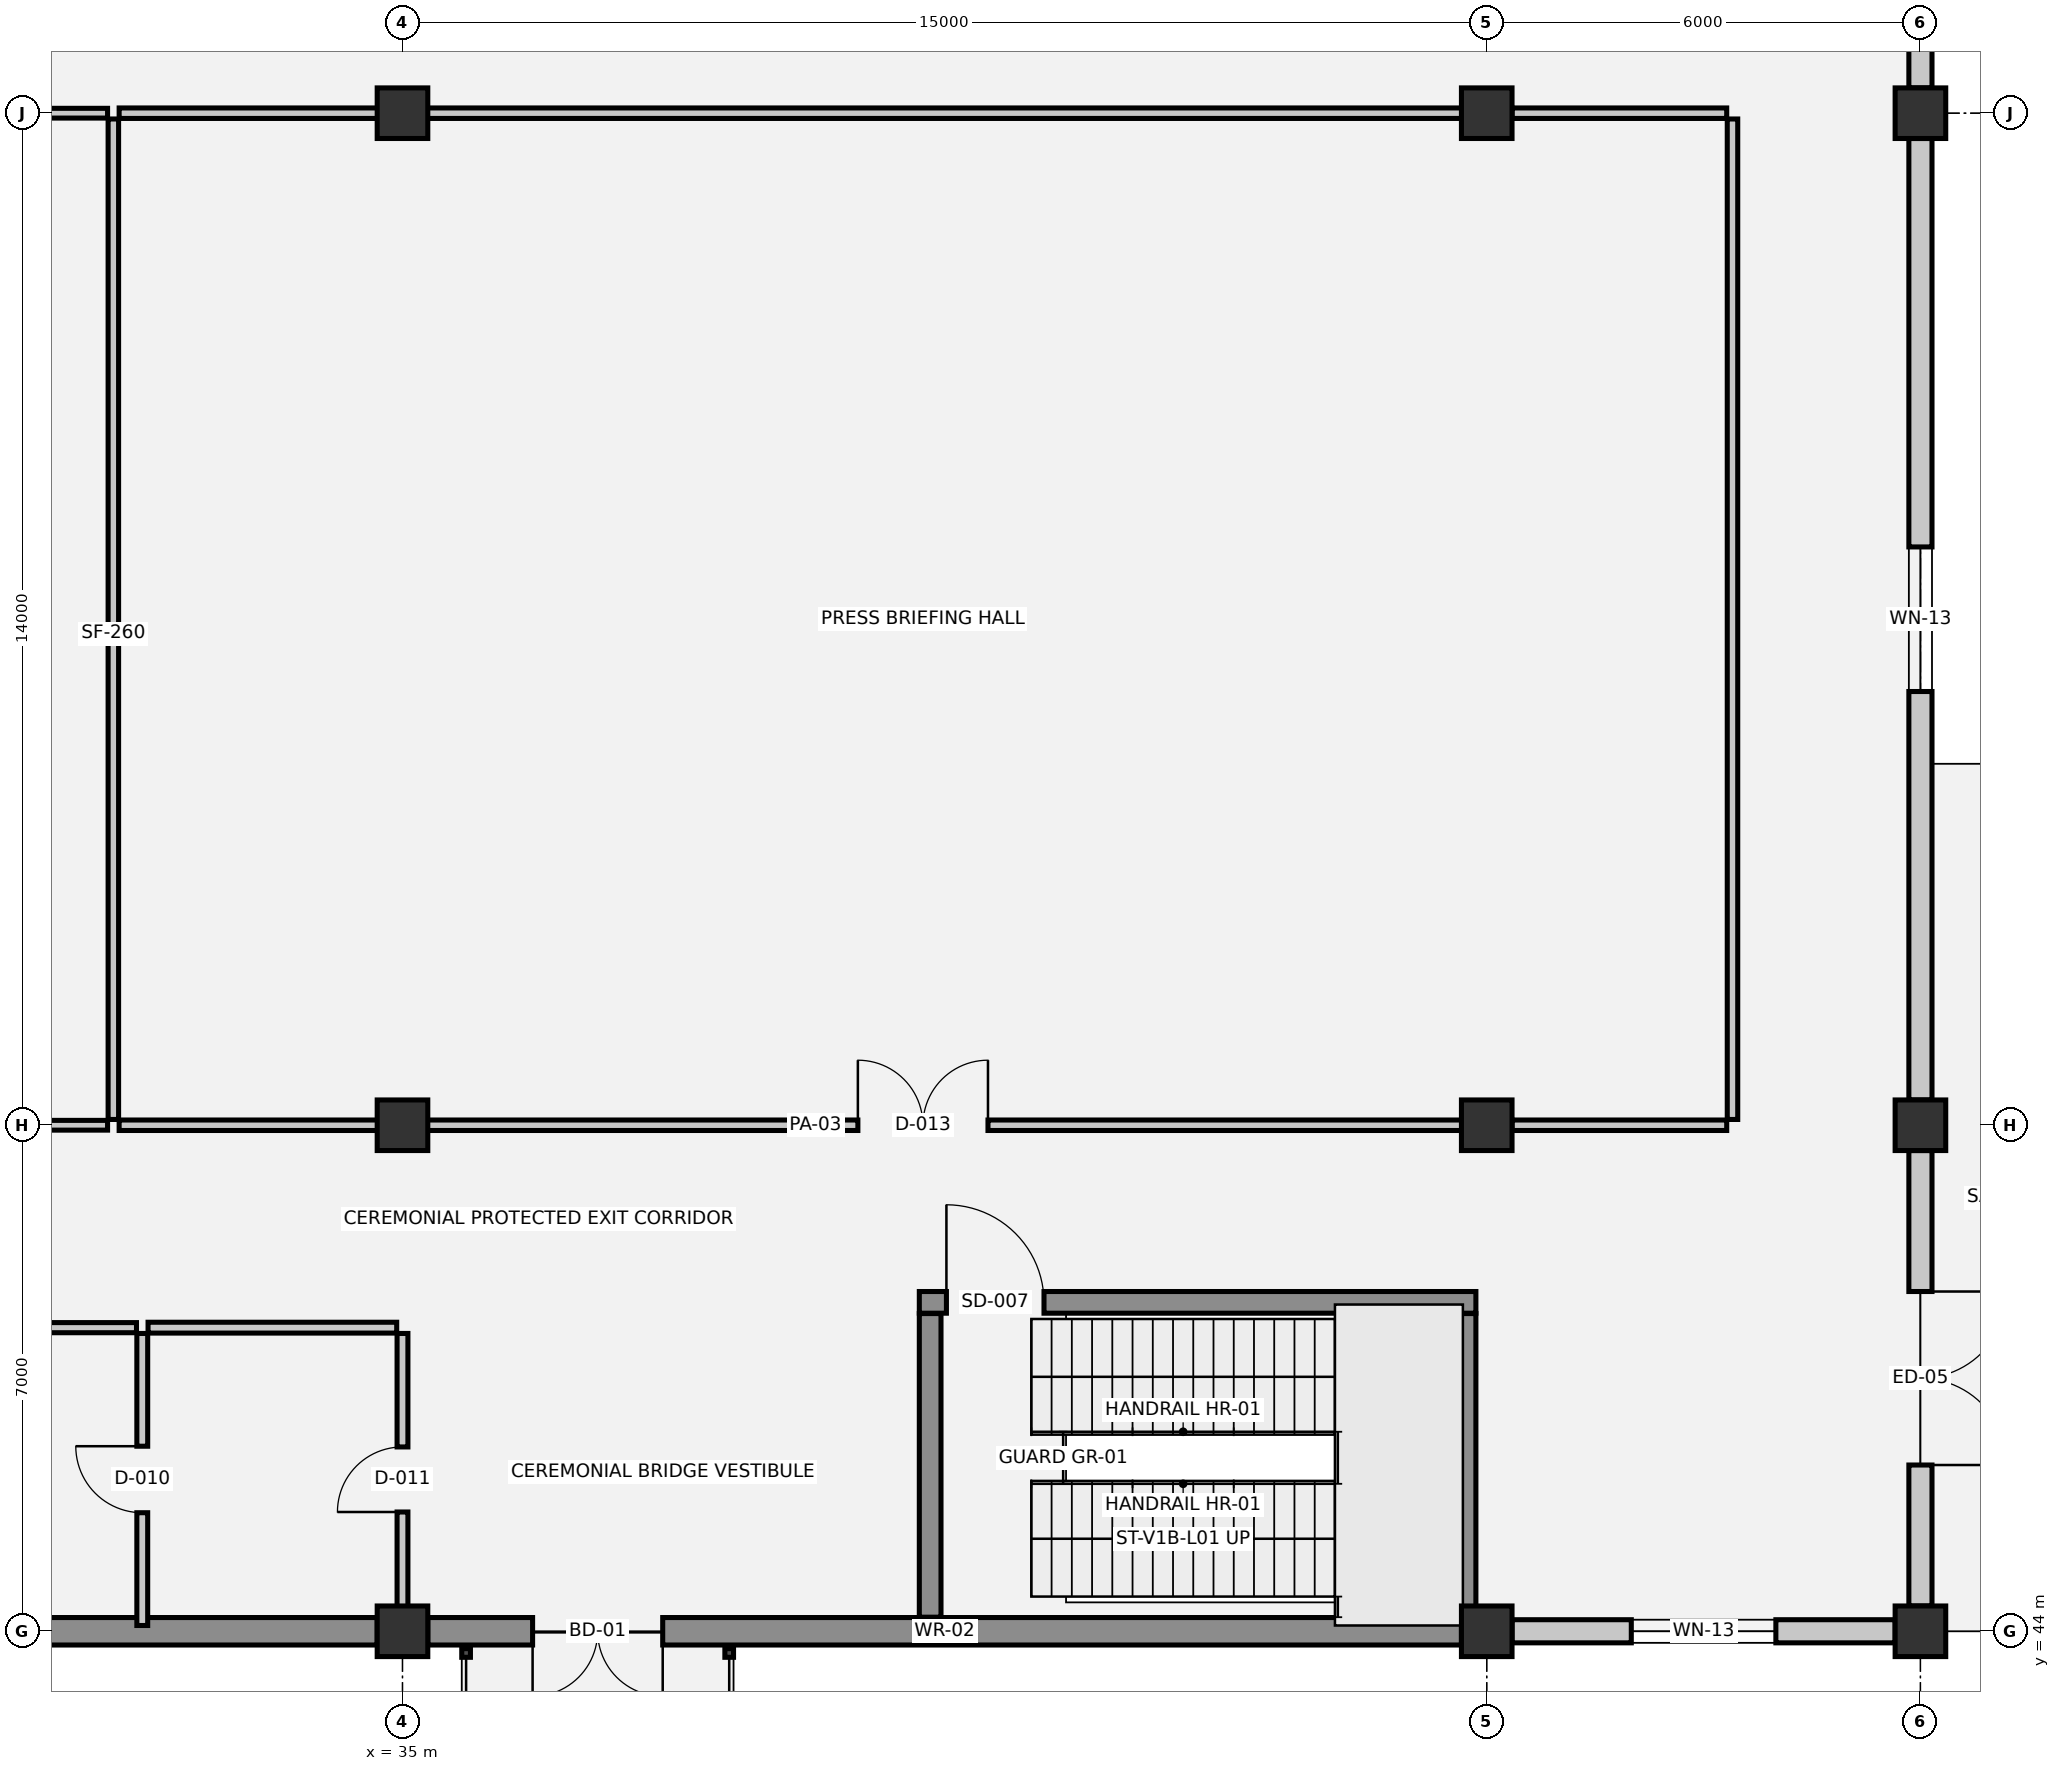
"""IFC4 building model, lengths in metres.
Left out: names, types, materials, properties, quantities, classifications, styles, units other than length and angle.
Written with IfcOpenShell. Run it as: python <this file> out.ifc"""

import sys

from ifc_helpers import new_model, si_unit, direction, frame, frame_2d, origin, origin_2d, place, context, subcontext, project, spatial, rectangle, extrude, element, fill, save


model = new_model("IFC4")
c1 = context("Model", 3, precision=1e-05, world=origin(), true_north=direction((0.0, 1.0)))
c2 = subcontext(c1, "Body", "Model", "MODEL_VIEW")
j1 = project(units=[si_unit("LENGTHUNIT", "METRE"), si_unit("PLANEANGLEUNIT", "RADIAN")], contexts=[c1])
p1 = place(None, origin())
s1 = spatial("IfcSite", under=j1, at=p1, CompositionType="ELEMENT")
p2 = place(p1, origin())
s2 = spatial("IfcBuilding", under=s1, at=p2, CompositionType="ELEMENT")
p3 = place(p2, origin())
s3 = spatial("IfcBuildingStorey", under=s2, at=p3, CompositionType="ELEMENT", Elevation=0.0)
for number, where, z_axis, x_axis in (
    (1, (35.0, 44.0, 0.0), (0.0, 0.0, 1.0), (1.0, 0.0, 0.0)),
    (2, (35.0, 51.0, 0.0), (0.0, 0.0, 1.0), (1.0, 0.0, 0.0)),
    (3, (35.0, 65.0, 0.0), (0.0, 0.0, 1.0), (1.0, 0.0, 0.0)),
    (4, (50.0, 44.0, 0.0), (0.0, 0.0, 1.0), (1.0, 0.0, 0.0)),
    (5, (50.0, 51.0, 0.0), (0.0, 0.0, 1.0), (1.0, 0.0, 0.0)),
    (6, (50.0, 65.0, 0.0), (0.0, 0.0, 1.0), (1.0, 0.0, 0.0)),
    (7, (56.0, 44.0, 0.0), (0.0, 0.0, 1.0), (1.0, 0.0, 0.0)),
    (8, (56.0, 51.0, 0.0), (0.0, 0.0, 1.0), (1.0, 0.0, 0.0)),
    (9, (56.0, 65.0, 0.0), (0.0, 0.0, 1.0), (1.0, 0.0, 0.0)),
):
    element("IfcColumn", number, at=place(p3, frame(where, z_axis=z_axis, x_axis=x_axis)), inside=s3, PredefinedType="COLUMN", context=c2, shape_type="SweptSolid", body=[
        extrude(rectangle(XDim=0.7, YDim=0.7, at=origin_2d()), origin(), (0.0, 0.0, 1.0), 5.4),
    ])
p4 = place(p3, frame((56.0, 71.65, 0.0), z_axis=(0.0, 0.0, 1.0), x_axis=(0.0, -1.0, 0.0)))
e10 = element("IfcWall", 10, at=p4, inside=s3, PredefinedType="SOLIDWALL", context=c2, shape_type="SweptSolid", body=[
    extrude(rectangle(XDim=6.3, YDim=0.32, at=frame_2d((3.15, 0.0))), origin(), (0.0, 0.0, 1.0), 4.01),
])
p5 = place(p4, frame((2.15, 0.0, 0.9)))
e11 = element("IfcOpeningElement", 11, at=p5, cuts=e10, PredefinedType="OPENING", context=c2, shape_type="SweptSolid", body=[
    extrude(rectangle(XDim=2.0, YDim=2.2, at=frame_2d((1.0, 1.1))), frame((0.0, 0.17, 0.0), z_axis=(0.0, -1.0, 0.0), x_axis=(1.0, 0.0, 0.0)), (0.0, 0.0, 1.0), 0.34),
])
p6 = place(p3, frame((56.0, 64.65, 0.0), z_axis=(0.0, 0.0, 1.0), x_axis=(0.0, -1.0, 0.0)))
e12 = element("IfcWall", 12, at=p6, inside=s3, PredefinedType="SOLIDWALL", context=c2, shape_type="SweptSolid", body=[
    extrude(rectangle(XDim=13.3, YDim=0.32, at=frame_2d((6.65, 0.0))), origin(), (0.0, 0.0, 1.0), 4.01),
])
p7 = place(p6, frame((5.65, 0.0, 0.9)))
e13 = element("IfcOpeningElement", 13, at=p7, cuts=e12, PredefinedType="OPENING", context=c2, shape_type="SweptSolid", body=[
    extrude(rectangle(XDim=2.0, YDim=2.2, at=frame_2d((1.0, 1.1))), frame((0.0, 0.17, 0.0), z_axis=(0.0, -1.0, 0.0), x_axis=(1.0, 0.0, 0.0)), (0.0, 0.0, 1.0), 0.34),
])
p8 = place(p3, frame((56.0, 50.65, 0.0), z_axis=(0.0, 0.0, 1.0), x_axis=(0.0, -1.0, 0.0)))
e14 = element("IfcWall", 14, at=p8, inside=s3, PredefinedType="SOLIDWALL", context=c2, shape_type="SweptSolid", body=[
    extrude(rectangle(XDim=6.3, YDim=0.32, at=frame_2d((3.15, 0.0))), origin(), (0.0, 0.0, 1.0), 4.01),
])
p9 = place(p8, frame((1.95, 0.0, 0.0)))
e15 = element("IfcOpeningElement", 15, at=p9, cuts=e14, PredefinedType="OPENING", context=c2, shape_type="SweptSolid", body=[
    extrude(rectangle(XDim=2.4, YDim=2.4, at=frame_2d((1.2, 1.2))), frame((0.0, 0.17, 0.0), z_axis=(0.0, -1.0, 0.0), x_axis=(1.0, 0.0, 0.0)), (0.0, 0.0, 1.0), 0.34),
])
p10 = place(p3, frame((55.65, 44.0, 0.0), z_axis=(0.0, 0.0, 1.0), x_axis=(-1.0, 0.0, 0.0)))
e16 = element("IfcWall", 16, at=p10, inside=s3, PredefinedType="SOLIDWALL", context=c2, shape_type="SweptSolid", body=[
    extrude(rectangle(XDim=5.3, YDim=0.32, at=frame_2d((2.65, 0.0))), origin(), (0.0, 0.0, 1.0), 4.01),
])
p11 = place(p10, frame((1.65, 0.0, 0.9)))
e17 = element("IfcOpeningElement", 17, at=p11, cuts=e16, PredefinedType="OPENING", context=c2, shape_type="SweptSolid", body=[
    extrude(rectangle(XDim=2.0, YDim=2.2, at=frame_2d((1.0, 1.1))), frame((0.0, 0.17, 0.0), z_axis=(0.0, -1.0, 0.0), x_axis=(1.0, 0.0, 0.0)), (0.0, 0.0, 1.0), 0.34),
])
p12 = place(p3, frame((49.65, 44.0, 0.0), z_axis=(0.0, 0.0, 1.0), x_axis=(-1.0, 0.0, 0.0)))
e18 = element("IfcWall", 18, at=p12, inside=s3, PredefinedType="STANDARD", context=c2, shape_type="SweptSolid", body=[
    extrude(rectangle(XDim=14.3, YDim=0.38, at=frame_2d((7.15, 0.0))), origin(), (0.0, 0.0, 1.0), 4.01),
])
p13 = place(p12, frame((11.05, 0.0, 0.0)))
e19 = element("IfcOpeningElement", 19, at=p13, cuts=e18, PredefinedType="OPENING", context=c2, shape_type="SweptSolid", body=[
    extrude(rectangle(XDim=1.8, YDim=2.25, at=frame_2d((0.9, 1.125))), frame((0.0, 0.2, 0.0), z_axis=(0.0, -1.0, 0.0), x_axis=(1.0, 0.0, 0.0)), (0.0, 0.0, 1.0), 0.4),
])
p14 = place(p3, frame((34.65, 44.0, 0.0), z_axis=(0.0, 0.0, 1.0), x_axis=(-1.0, 0.0, 0.0)))
e20 = element("IfcWall", 20, at=p14, inside=s3, PredefinedType="STANDARD", context=c2, shape_type="SweptSolid", body=[
    extrude(rectangle(XDim=14.3, YDim=0.38, at=frame_2d((7.15, 0.0))), origin(), (0.0, 0.0, 1.0), 4.01),
])
p15 = place(p14, frame((5.63, 0.0, 0.95)))
e21 = element("IfcOpeningElement", 21, at=p15, cuts=e20, PredefinedType="OPENING", context=c2, shape_type="SweptSolid", body=[
    extrude(rectangle(XDim=0.8, YDim=1.5, at=frame_2d((0.4, 0.75))), frame((0.0, 0.2, 0.0), z_axis=(0.0, -1.0, 0.0), x_axis=(1.0, 0.0, 0.0)), (0.0, 0.0, 1.0), 0.4),
])
p16 = place(p3, frame((42.15, 48.55, 0.0), z_axis=(0.0, 0.0, 1.0), x_axis=(1.0, 0.0, 0.0)))
e22 = element("IfcWall", 22, at=p16, inside=s3, PredefinedType="SHEAR", context=c2, shape_type="SweptSolid", body=[
    extrude(rectangle(XDim=7.7, YDim=0.3, at=frame_2d((3.85, 0.0))), origin(), (0.0, 0.0, 1.0), 5.14),
])
p17 = place(p16, frame((0.375, 0.0, 0.0)))
e23 = element("IfcOpeningElement", 23, at=p17, cuts=e22, PredefinedType="OPENING", context=c2, shape_type="SweptSolid", body=[
    extrude(rectangle(XDim=1.35, YDim=2.2, at=frame_2d((0.675, 1.1))), frame((0.0, 0.16, 0.0), z_axis=(0.0, -1.0, 0.0), x_axis=(1.0, 0.0, 0.0)), (0.0, 0.0, 1.0), 0.32),
])
for number, where, z_axis, x_axis in (
    (24, (42.3, 48.395, 0.0), (0.0, 0.0, 1.0), (0.0, -1.0, 0.0)),
    (25, (49.7, 44.195, 0.0), (0.0, 0.0, 1.0), (0.0, 1.0, 0.0)),
):
    element("IfcWall", number, at=place(p3, frame(where, z_axis=z_axis, x_axis=x_axis)), inside=s3, PredefinedType="SHEAR", context=c2, shape_type="SweptSolid", body=[
        extrude(rectangle(XDim=4.2, YDim=0.3, at=frame_2d((2.1, 0.0))), origin(), (0.0, 0.0, 1.0), 5.14),
    ])
p18 = place(p3, frame((28.08, 48.2, 0.0), z_axis=(0.0, 0.0, 1.0), x_axis=(1.0, 0.0, 0.0)))
e26 = element("IfcWall", 26, at=p18, inside=s3, PredefinedType="PLUMBINGWALL", context=c2, shape_type="SweptSolid", body=[
    extrude(rectangle(XDim=3.24, YDim=0.14, at=frame_2d((1.62, 0.0))), origin(), (0.0, 0.0, 1.0), 5.04),
])
p19 = place(p3, frame((31.48, 48.2, 0.0), z_axis=(0.0, 0.0, 1.0), x_axis=(1.0, 0.0, 0.0)))
e27 = element("IfcWall", 27, at=p19, inside=s3, PredefinedType="PARTITIONING", context=c2, shape_type="SweptSolid", body=[
    extrude(rectangle(XDim=3.44, YDim=0.15, at=frame_2d((1.72, 0.0))), origin(), (0.0, 0.0, 1.0), 5.04),
])
p20 = place(p3, frame((19.65, 51.0, 0.0), z_axis=(0.0, 0.0, 1.0), x_axis=(1.0, 0.0, 0.0)))
e28 = element("IfcWall", 28, at=p20, inside=s3, PredefinedType="PARTITIONING", context=c2, shape_type="SweptSolid", body=[
    extrude(rectangle(XDim=11.27, YDim=0.135, at=frame_2d((5.635, 0.0))), origin(), (0.0, 0.0, 1.0), 4.18),
])
p21 = place(p3, frame((31.08, 51.0, 0.0), z_axis=(0.0, 0.0, 1.0), x_axis=(1.0, 0.0, 0.0)))
e29 = element("IfcWall", 29, at=p21, inside=s3, PredefinedType="PARTITIONING", context=c2, shape_type="SweptSolid", body=[
    extrude(rectangle(XDim=19.27, YDim=0.145, at=frame_2d((9.635, 0.0))), origin(), (0.0, 0.0, 1.0), 4.18),
])
p22 = place(p21, frame((10.22, 0.0, 0.0)))
e30 = element("IfcOpeningElement", 30, at=p22, cuts=e29, PredefinedType="OPENING", context=c2, shape_type="SweptSolid", body=[
    extrude(rectangle(XDim=1.8, YDim=2.3, at=frame_2d((0.9, 1.15))), frame((0.0, 0.083, 0.0), z_axis=(0.0, -1.0, 0.0), x_axis=(1.0, 0.0, 0.0)), (0.0, 0.0, 1.0), 0.165),
])
p23 = place(p3, frame((50.35, 51.0, 0.0), z_axis=(0.0, 0.0, 1.0), x_axis=(1.0, 0.0, 0.0)))
e31 = element("IfcWall", 31, at=p23, inside=s3, PredefinedType="PARTITIONING", context=c2, shape_type="SweptSolid", body=[
    extrude(rectangle(XDim=2.97, YDim=0.145, at=frame_2d((1.485, 0.0))), origin(), (0.0, 0.0, 1.0), 4.43),
])
p24 = place(p3, frame((19.65, 65.0, 0.0), z_axis=(0.0, 0.0, 1.0), x_axis=(1.0, 0.0, 0.0)))
e32 = element("IfcWall", 32, at=p24, inside=s3, PredefinedType="PARTITIONING", context=c2, shape_type="SweptSolid", body=[
    extrude(rectangle(XDim=11.27, YDim=0.135, at=frame_2d((5.635, 0.0))), origin(), (0.0, 0.0, 1.0), 4.18),
])
p25 = place(p3, frame((31.08, 65.0, 0.0), z_axis=(0.0, 0.0, 1.0), x_axis=(1.0, 0.0, 0.0)))
e33 = element("IfcWall", 33, at=p25, inside=s3, PredefinedType="PARTITIONING", context=c2, shape_type="SweptSolid", body=[
    extrude(rectangle(XDim=19.27, YDim=0.145, at=frame_2d((9.635, 0.0))), origin(), (0.0, 0.0, 1.0), 4.18),
])
p26 = place(p3, frame((50.35, 65.0, 0.0), z_axis=(0.0, 0.0, 1.0), x_axis=(1.0, 0.0, 0.0)))
e34 = element("IfcWall", 34, at=p26, inside=s3, PredefinedType="PARTITIONING", context=c2, shape_type="SweptSolid", body=[
    extrude(rectangle(XDim=2.97, YDim=0.145, at=frame_2d((1.485, 0.0))), origin(), (0.0, 0.0, 1.0), 4.43),
])
p27 = place(p3, frame((31.0, 51.08, 0.0), z_axis=(0.0, 0.0, 1.0), x_axis=(0.0, 1.0, 0.0)))
e35 = element("IfcWall", 35, at=p27, inside=s3, PredefinedType="PARTITIONING", context=c2, shape_type="SweptSolid", body=[
    extrude(rectangle(XDim=13.84, YDim=0.145, at=frame_2d((6.92, 0.0))), origin(), (0.0, 0.0, 1.0), 5.04),
])
p28 = place(p3, frame((31.4, 44.08, 0.0), z_axis=(0.0, 0.0, 1.0), x_axis=(0.0, 1.0, 0.0)))
e36 = element("IfcWall", 36, at=p28, inside=s3, PredefinedType="PARTITIONING", context=c2, shape_type="SweptSolid", body=[
    extrude(rectangle(XDim=4.04, YDim=0.15, at=frame_2d((2.02, 0.0))), origin(), (0.0, 0.0, 1.0), 5.04),
])
p29 = place(p28, frame((1.56, 0.0, 0.0)))
e37 = element("IfcOpeningElement", 37, at=p29, cuts=e36, PredefinedType="OPENING", context=c2, shape_type="SweptSolid", body=[
    extrude(rectangle(XDim=0.92, YDim=2.1, at=frame_2d((0.46, 1.05))), frame((0.0, 0.085, 0.0), z_axis=(0.0, -1.0, 0.0), x_axis=(1.0, 0.0, 0.0)), (0.0, 0.0, 1.0), 0.17),
])
p30 = place(p3, frame((35.0, 44.08, 0.0), z_axis=(0.0, 0.0, 1.0), x_axis=(0.0, 1.0, 0.0)))
e38 = element("IfcWall", 38, at=p30, inside=s3, PredefinedType="PARTITIONING", context=c2, shape_type="SweptSolid", body=[
    extrude(rectangle(XDim=4.04, YDim=0.15, at=frame_2d((2.02, 0.0))), origin(), (0.0, 0.0, 1.0), 4.48),
])
p31 = place(p30, frame((1.57, 0.0, 0.0)))
e39 = element("IfcOpeningElement", 39, at=p31, cuts=e38, PredefinedType="OPENING", context=c2, shape_type="SweptSolid", body=[
    extrude(rectangle(XDim=0.9, YDim=2.15, at=frame_2d((0.45, 1.075))), frame((0.0, 0.085, 0.0), z_axis=(0.0, -1.0, 0.0), x_axis=(1.0, 0.0, 0.0)), (0.0, 0.0, 1.0), 0.17),
])
p32 = place(p3, frame((53.4, 51.08, 0.0), z_axis=(0.0, 0.0, 1.0), x_axis=(0.0, 1.0, 0.0)))
e40 = element("IfcWall", 40, at=p32, inside=s3, PredefinedType="PARTITIONING", context=c2, shape_type="SweptSolid", body=[
    extrude(rectangle(XDim=13.84, YDim=0.145, at=frame_2d((6.92, 0.0))), origin(), (0.0, 0.0, 1.0), 5.04),
])
p33 = place(p7, origin())
e41 = element("IfcWindow", 41, at=p33, inside=s3, PartitioningType="SINGLE_PANEL", PredefinedType="WINDOW", context=c2, shape_type="SweptSolid", body=[
    extrude(rectangle(XDim=2.0, YDim=2.2, at=frame_2d((1.0, 1.1))), frame((0.0, 0.03, 0.0), z_axis=(0.0, -1.0, 0.0), x_axis=(1.0, 0.0, 0.0)), (0.0, 0.0, 1.0), 0.06),
])
fill(e13, e41)
p34 = place(p9, origin())
e42 = element("IfcDoor", 42, at=p34, inside=s3, OperationType="DOUBLE_DOOR_SINGLE_SWING", PredefinedType="DOOR", context=c2, shape_type="SweptSolid", body=[
    extrude(rectangle(XDim=2.4, YDim=2.4, at=frame_2d((1.2, 1.2))), frame((0.0, 0.025, 0.0), z_axis=(0.0, -1.0, 0.0), x_axis=(1.0, 0.0, 0.0)), (0.0, 0.0, 1.0), 0.05),
])
fill(e15, e42)
p35 = place(p11, origin())
e43 = element("IfcWindow", 43, at=p35, inside=s3, PartitioningType="SINGLE_PANEL", PredefinedType="WINDOW", context=c2, shape_type="SweptSolid", body=[
    extrude(rectangle(XDim=2.0, YDim=2.2, at=frame_2d((1.0, 1.1))), frame((0.0, 0.03, 0.0), z_axis=(0.0, -1.0, 0.0), x_axis=(1.0, 0.0, 0.0)), (0.0, 0.0, 1.0), 0.06),
])
fill(e17, e43)
p36 = place(p13, origin())
e44 = element("IfcDoor", 44, at=p36, inside=s3, OperationType="DOUBLE_DOOR_SINGLE_SWING", PredefinedType="DOOR", context=c2, shape_type="SweptSolid", body=[
    extrude(rectangle(XDim=1.8, YDim=2.25, at=frame_2d((0.9, 1.125))), frame((0.0, 0.025, 0.0), z_axis=(0.0, -1.0, 0.0), x_axis=(1.0, 0.0, 0.0)), (0.0, 0.0, 1.0), 0.05),
])
fill(e19, e44)
p37 = place(p17, origin())
e45 = element("IfcDoor", 45, at=p37, inside=s3, OperationType="SINGLE_SWING_LEFT", PredefinedType="DOOR", context=c2, shape_type="SweptSolid", body=[
    extrude(rectangle(XDim=1.35, YDim=2.2, at=frame_2d((0.675, 1.1))), frame((0.0, 0.025, 0.0), z_axis=(0.0, -1.0, 0.0), x_axis=(1.0, 0.0, 0.0)), (0.0, 0.0, 1.0), 0.05),
])
fill(e23, e45)
p38 = place(p29, origin())
e46 = element("IfcDoor", 46, at=p38, inside=s3, OperationType="SINGLE_SWING_RIGHT", PredefinedType="DOOR", context=c2, shape_type="SweptSolid", body=[
    extrude(rectangle(XDim=0.92, YDim=2.1, at=frame_2d((0.46, 1.05))), frame((0.0, 0.025, 0.0), z_axis=(0.0, -1.0, 0.0), x_axis=(1.0, 0.0, 0.0)), (0.0, 0.0, 1.0), 0.05),
])
fill(e37, e46)
p39 = place(p31, origin())
e47 = element("IfcDoor", 47, at=p39, inside=s3, OperationType="SINGLE_SWING_LEFT", PredefinedType="DOOR", context=c2, shape_type="SweptSolid", body=[
    extrude(rectangle(XDim=0.9, YDim=2.15, at=frame_2d((0.45, 1.075))), frame((0.0, 0.025, 0.0), z_axis=(0.0, -1.0, 0.0), x_axis=(1.0, 0.0, 0.0)), (0.0, 0.0, 1.0), 0.05),
])
fill(e39, e47)
p40 = place(p22, origin())
e48 = element("IfcDoor", 48, at=p40, inside=s3, OperationType="DOUBLE_DOOR_SINGLE_SWING", PredefinedType="DOOR", context=c2, shape_type="SweptSolid", body=[
    extrude(rectangle(XDim=1.8, YDim=2.3, at=frame_2d((0.9, 1.15))), frame((0.0, 0.025, 0.0), z_axis=(0.0, -1.0, 0.0), x_axis=(1.0, 0.0, 0.0)), (0.0, 0.0, 1.0), 0.05),
])
fill(e30, e48)
save(model, sys.argv[1])
